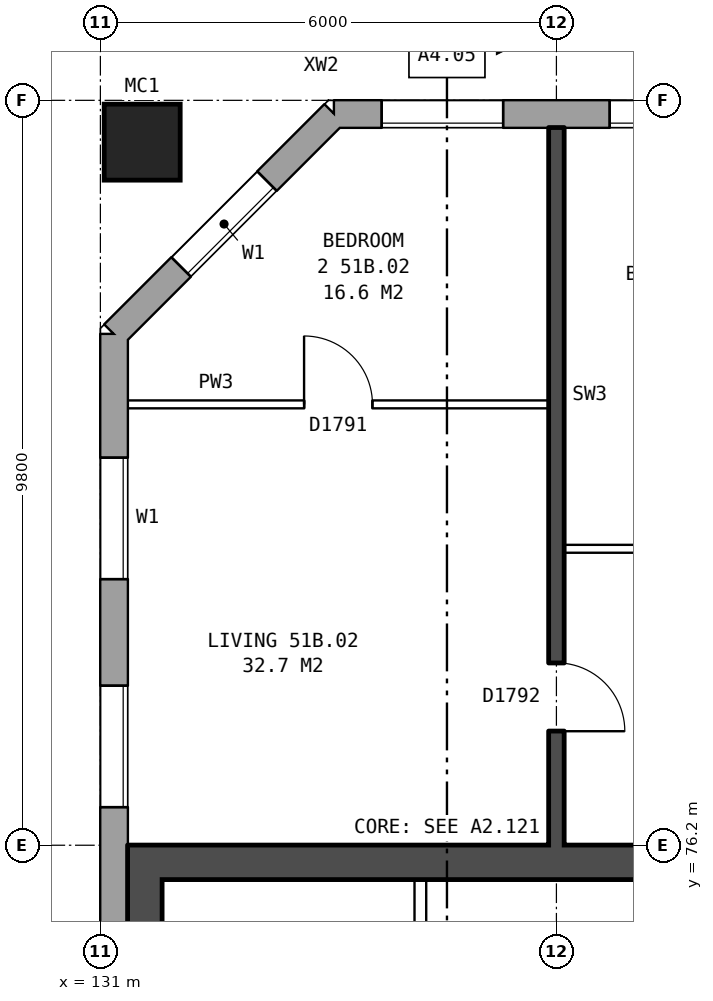
"""IFC4 building model, lengths in metres.
Left out: names, types, materials, properties, quantities, classifications, styles, units other than length and angle.
Written with IfcOpenShell. Run it as: python <this file> out.ifc"""

import sys

from ifc_helpers import new_model, si_unit, direction, frame, frame_2d, origin, origin_2d, place, context, subcontext, project, spatial, rectangle, hollow_rectangle, extrude, element, fill, save


model = new_model("IFC4")
c1 = context("Model", 3, precision=1e-05, world=origin(), true_north=direction((0.0, 1.0)))
c2 = subcontext(c1, "Body", "Model", "MODEL_VIEW")
j1 = project(units=[si_unit("LENGTHUNIT", "METRE"), si_unit("PLANEANGLEUNIT", "RADIAN")], contexts=[c1])
p1 = place(None, origin())
s1 = spatial("IfcSite", under=j1, at=p1, CompositionType="ELEMENT")
p2 = place(p1, origin())
s2 = spatial("IfcBuilding", under=s1, at=p2, CompositionType="ELEMENT")
p3 = place(p2, frame((0.0, 0.0, 182.0)))
s3 = spatial("IfcBuildingStorey", under=s2, at=p3, CompositionType="ELEMENT", Elevation=182.0)
p4 = place(p3, frame((131.55, 85.45, 0.0), z_axis=(0.0, 0.0, 1.0), x_axis=(1.0, 0.0, 0.0)))
e1 = element("IfcColumn", 1, at=p4, inside=s3, PredefinedType="COLUMN", context=c2, shape_type="SweptSolid", body=[
    extrude(hollow_rectangle(XDim=1.0, YDim=1.0, WallThickness=0.055, at=origin_2d()), origin(), (0.0, 0.0, 1.0), 3.1),
])
p5 = place(p3, frame((167.175, 85.82, 0.0), z_axis=(0.0, 0.0, 1.0), x_axis=(-1.0, 0.0, 0.0)))
e2 = element("IfcWall", 2, at=p5, inside=s3, PredefinedType="STANDARD", context=c2, shape_type="SweptSolid", body=[
    extrude(rectangle(XDim=33.101, YDim=0.36, at=frame_2d((16.55, 0.0))), origin(), (0.0, 0.0, 1.0), 2.85),
])
p6 = place(p5, frame((0.875, 0.0, 0.8)))
e3 = element("IfcOpeningElement", 3, at=p6, cuts=e2, PredefinedType="OPENING", context=c2, shape_type="SweptSolid", body=[
    extrude(rectangle(XDim=1.6, YDim=1.8, at=frame_2d((0.8, 0.9))), frame((0.0, 0.19, 0.0), z_axis=(0.0, -1.0, 0.0), x_axis=(1.0, 0.0, 0.0)), (0.0, 0.0, 1.0), 0.38),
])
p7 = place(p5, frame((3.875, 0.0, 0.8)))
e4 = element("IfcOpeningElement", 4, at=p7, cuts=e2, PredefinedType="OPENING", context=c2, shape_type="SweptSolid", body=[
    extrude(rectangle(XDim=1.6, YDim=1.8, at=frame_2d((0.8, 0.9))), frame((0.0, 0.19, 0.0), z_axis=(0.0, -1.0, 0.0), x_axis=(1.0, 0.0, 0.0)), (0.0, 0.0, 1.0), 0.38),
])
p8 = place(p5, frame((6.375, 0.0, 1.5)))
e5 = element("IfcOpeningElement", 5, at=p8, cuts=e2, PredefinedType="OPENING", context=c2, shape_type="SweptSolid", body=[
    extrude(rectangle(XDim=0.6, YDim=0.9, at=frame_2d((0.3, 0.45))), frame((0.0, 0.19, 0.0), z_axis=(0.0, -1.0, 0.0), x_axis=(1.0, 0.0, 0.0)), (0.0, 0.0, 1.0), 0.38),
])
p9 = place(p5, frame((9.875, 0.0, 0.8)))
e6 = element("IfcOpeningElement", 6, at=p9, cuts=e2, PredefinedType="OPENING", context=c2, shape_type="SweptSolid", body=[
    extrude(rectangle(XDim=1.6, YDim=1.8, at=frame_2d((0.8, 0.9))), frame((0.0, 0.19, 0.0), z_axis=(0.0, -1.0, 0.0), x_axis=(1.0, 0.0, 0.0)), (0.0, 0.0, 1.0), 0.38),
])
p10 = place(p5, frame((12.875, 0.0, 0.8)))
e7 = element("IfcOpeningElement", 7, at=p10, cuts=e2, PredefinedType="OPENING", context=c2, shape_type="SweptSolid", body=[
    extrude(rectangle(XDim=1.6, YDim=1.8, at=frame_2d((0.8, 0.9))), frame((0.0, 0.19, 0.0), z_axis=(0.0, -1.0, 0.0), x_axis=(1.0, 0.0, 0.0)), (0.0, 0.0, 1.0), 0.38),
])
p11 = place(p5, frame((15.875, 0.0, 0.8)))
e8 = element("IfcOpeningElement", 8, at=p11, cuts=e2, PredefinedType="OPENING", context=c2, shape_type="SweptSolid", body=[
    extrude(rectangle(XDim=1.6, YDim=1.8, at=frame_2d((0.8, 0.9))), frame((0.0, 0.19, 0.0), z_axis=(0.0, -1.0, 0.0), x_axis=(1.0, 0.0, 0.0)), (0.0, 0.0, 1.0), 0.38),
])
p12 = place(p5, frame((18.875, 0.0, 0.8)))
e9 = element("IfcOpeningElement", 9, at=p12, cuts=e2, PredefinedType="OPENING", context=c2, shape_type="SweptSolid", body=[
    extrude(rectangle(XDim=1.6, YDim=1.8, at=frame_2d((0.8, 0.9))), frame((0.0, 0.19, 0.0), z_axis=(0.0, -1.0, 0.0), x_axis=(1.0, 0.0, 0.0)), (0.0, 0.0, 1.0), 0.38),
])
p13 = place(p5, frame((21.875, 0.0, 0.8)))
e10 = element("IfcOpeningElement", 10, at=p13, cuts=e2, PredefinedType="OPENING", context=c2, shape_type="SweptSolid", body=[
    extrude(rectangle(XDim=1.6, YDim=1.8, at=frame_2d((0.8, 0.9))), frame((0.0, 0.19, 0.0), z_axis=(0.0, -1.0, 0.0), x_axis=(1.0, 0.0, 0.0)), (0.0, 0.0, 1.0), 0.38),
])
p14 = place(p5, frame((25.975, 0.0, 1.7)))
e11 = element("IfcOpeningElement", 11, at=p14, cuts=e2, PredefinedType="OPENING", context=c2, shape_type="SweptSolid", body=[
    extrude(rectangle(XDim=0.6, YDim=0.9, at=frame_2d((0.3, 0.45))), frame((0.0, 0.19, 0.0), z_axis=(0.0, -1.0, 0.0), x_axis=(1.0, 0.0, 0.0)), (0.0, 0.0, 1.0), 0.38),
])
p15 = place(p5, frame((27.875, 0.0, 0.8)))
e12 = element("IfcOpeningElement", 12, at=p15, cuts=e2, PredefinedType="OPENING", context=c2, shape_type="SweptSolid", body=[
    extrude(rectangle(XDim=1.6, YDim=1.8, at=frame_2d((0.8, 0.9))), frame((0.0, 0.19, 0.0), z_axis=(0.0, -1.0, 0.0), x_axis=(1.0, 0.0, 0.0)), (0.0, 0.0, 1.0), 0.38),
])
p16 = place(p5, frame((30.875, 0.0, 0.8)))
e13 = element("IfcOpeningElement", 13, at=p16, cuts=e2, PredefinedType="OPENING", context=c2, shape_type="SweptSolid", body=[
    extrude(rectangle(XDim=1.6, YDim=1.8, at=frame_2d((0.8, 0.9))), frame((0.0, 0.19, 0.0), z_axis=(0.0, -1.0, 0.0), x_axis=(1.0, 0.0, 0.0)), (0.0, 0.0, 1.0), 0.38),
])
p17 = place(p5, frame((8.175, 0.0, 0.8)))
e14 = element("IfcOpeningElement", 14, at=p17, cuts=e2, PredefinedType="OPENING", context=c2, shape_type="SweptSolid", body=[
    extrude(rectangle(XDim=1.4, YDim=0.9, at=frame_2d((0.7, 0.45))), frame((0.0, 0.19, 0.0), z_axis=(0.0, -1.0, 0.0), x_axis=(1.0, 0.0, 0.0)), (0.0, 0.0, 1.0), 0.38),
])
p18 = place(p5, frame((26.875, 0.0, 0.8)))
e15 = element("IfcOpeningElement", 15, at=p18, cuts=e2, PredefinedType="OPENING", context=c2, shape_type="SweptSolid", body=[
    extrude(rectangle(XDim=0.6, YDim=1.8, at=frame_2d((0.3, 0.9))), frame((0.0, 0.19, 0.0), z_axis=(0.0, -1.0, 0.0), x_axis=(1.0, 0.0, 0.0)), (0.0, 0.0, 1.0), 0.38),
])
p19 = place(p3, frame((134.075, 85.82, 0.0), z_axis=(0.0, 0.0, 1.0), x_axis=(-0.707106781187, -0.707106781187, 0.0)))
e16 = element("IfcWall", 16, at=p19, inside=s3, PredefinedType="STANDARD", context=c2, shape_type="SweptSolid", body=[
    extrude(rectangle(XDim=4.094, YDim=0.36, at=frame_2d((2.047, 0.0))), origin(), (0.0, 0.0, 1.0), 2.85),
])
p20 = place(p19, frame((1.247, 0.0, 0.8)))
e17 = element("IfcOpeningElement", 17, at=p20, cuts=e16, PredefinedType="OPENING", context=c2, shape_type="SweptSolid", body=[
    extrude(rectangle(XDim=1.6, YDim=1.8, at=frame_2d((0.8, 0.9))), frame((0.0, 0.19, 0.0), z_axis=(0.0, -1.0, 0.0), x_axis=(1.0, 0.0, 0.0)), (0.0, 0.0, 1.0), 0.38),
])
p21 = place(p3, frame((131.18, 82.925, 0.0), z_axis=(0.0, 0.0, 1.0), x_axis=(0.0, -1.0, 0.0)))
e18 = element("IfcWall", 18, at=p21, inside=s3, PredefinedType="STANDARD", context=c2, shape_type="SweptSolid", body=[
    extrude(rectangle(XDim=25.851, YDim=0.36, at=frame_2d((12.925, 0.0))), origin(), (0.0, 0.0, 1.0), 2.85),
])
p22 = place(p21, frame((1.625, 0.0, 0.8)))
e19 = element("IfcOpeningElement", 19, at=p22, cuts=e18, PredefinedType="OPENING", context=c2, shape_type="SweptSolid", body=[
    extrude(rectangle(XDim=1.6, YDim=1.8, at=frame_2d((0.8, 0.9))), frame((0.0, 0.19, 0.0), z_axis=(0.0, -1.0, 0.0), x_axis=(1.0, 0.0, 0.0)), (0.0, 0.0, 1.0), 0.38),
])
p23 = place(p21, frame((4.625, 0.0, 0.8)))
e20 = element("IfcOpeningElement", 20, at=p23, cuts=e18, PredefinedType="OPENING", context=c2, shape_type="SweptSolid", body=[
    extrude(rectangle(XDim=1.6, YDim=1.8, at=frame_2d((0.8, 0.9))), frame((0.0, 0.19, 0.0), z_axis=(0.0, -1.0, 0.0), x_axis=(1.0, 0.0, 0.0)), (0.0, 0.0, 1.0), 0.38),
])
p24 = place(p21, frame((19.625, 0.0, 0.8)))
e21 = element("IfcOpeningElement", 21, at=p24, cuts=e18, PredefinedType="OPENING", context=c2, shape_type="SweptSolid", body=[
    extrude(rectangle(XDim=1.6, YDim=1.8, at=frame_2d((0.8, 0.9))), frame((0.0, 0.19, 0.0), z_axis=(0.0, -1.0, 0.0), x_axis=(1.0, 0.0, 0.0)), (0.0, 0.0, 1.0), 0.38),
])
p25 = place(p21, frame((22.625, 0.0, 0.8)))
e22 = element("IfcOpeningElement", 22, at=p25, cuts=e18, PredefinedType="OPENING", context=c2, shape_type="SweptSolid", body=[
    extrude(rectangle(XDim=1.6, YDim=1.8, at=frame_2d((0.8, 0.9))), frame((0.0, 0.19, 0.0), z_axis=(0.0, -1.0, 0.0), x_axis=(1.0, 0.0, 0.0)), (0.0, 0.0, 1.0), 0.38),
])
p26 = place(p3, frame((131.585, 63.8, 0.0), z_axis=(0.0, 0.0, 1.0), x_axis=(0.0, 1.0, 0.0)))
e23 = element("IfcWall", 23, at=p26, inside=s3, PredefinedType="SHEAR", context=c2, shape_type="SweptSolid", body=[
    extrude(rectangle(XDim=12.4, YDim=0.45, at=frame_2d((6.2, 0.0))), origin(), (0.0, 0.0, 1.0), 2.85),
])
p27 = place(p3, frame((139.31, 75.975, 0.0), z_axis=(0.0, 0.0, 1.0), x_axis=(-1.0, 0.0, 0.0)))
e24 = element("IfcWall", 24, at=p27, inside=s3, PredefinedType="SHEAR", context=c2, shape_type="SweptSolid", body=[
    extrude(rectangle(XDim=7.5, YDim=0.45, at=frame_2d((3.75, 0.0))), origin(), (0.0, 0.0, 1.0), 2.85),
])
p28 = place(p3, frame((135.21, 71.375, 0.0), z_axis=(0.0, 0.0, 1.0), x_axis=(0.0, 1.0, 0.0)))
e25 = element("IfcWall", 25, at=p28, inside=s3, PredefinedType="PARTITIONING", context=c2, shape_type="SweptSolid", body=[
    extrude(rectangle(XDim=4.375, YDim=0.15, at=frame_2d((2.188, 0.0))), origin(), (0.0, 0.0, 1.0), 2.85),
])
p29 = place(p28, frame((2.675, 0.0, 0.0)))
e26 = element("IfcOpeningElement", 26, at=p29, cuts=e25, PredefinedType="OPENING", context=c2, shape_type="SweptSolid", body=[
    extrude(rectangle(XDim=1.1, YDim=2.1, at=frame_2d((0.55, 1.05))), frame((0.0, 0.085, 0.0), z_axis=(0.0, -1.0, 0.0), x_axis=(1.0, 0.0, 0.0)), (0.0, 0.0, 1.0), 0.17),
])
p30 = place(p3, frame((137.1, 80.1, 0.0), z_axis=(0.0, 0.0, 1.0), x_axis=(1.0, 0.0, 0.0)))
e27 = element("IfcWall", 27, at=p30, inside=s3, PredefinedType="PARTITIONING", context=c2, shape_type="SweptSolid", body=[
    extrude(rectangle(XDim=5.8, YDim=0.1, at=frame_2d((2.9, 0.0))), origin(), (0.0, 0.0, 1.0), 2.85),
])
p31 = place(p30, frame((1.3, 0.0, 0.0)))
e28 = element("IfcOpeningElement", 28, at=p31, cuts=e27, PredefinedType="OPENING", context=c2, shape_type="SweptSolid", body=[
    extrude(rectangle(XDim=0.9, YDim=2.1, at=frame_2d((0.45, 1.05))), frame((0.0, 0.06, 0.0), z_axis=(0.0, -1.0, 0.0), x_axis=(1.0, 0.0, 0.0)), (0.0, 0.0, 1.0), 0.12),
])
p32 = place(p30, frame((4.2, 0.0, 0.0)))
e29 = element("IfcOpeningElement", 29, at=p32, cuts=e27, PredefinedType="OPENING", context=c2, shape_type="SweptSolid", body=[
    extrude(rectangle(XDim=0.9, YDim=2.1, at=frame_2d((0.45, 1.05))), frame((0.0, 0.06, 0.0), z_axis=(0.0, -1.0, 0.0), x_axis=(1.0, 0.0, 0.0)), (0.0, 0.0, 1.0), 0.12),
])
p33 = place(p3, frame((131.36, 82.0, 0.0), z_axis=(0.0, 0.0, 1.0), x_axis=(1.0, 0.0, 0.0)))
e30 = element("IfcWall", 30, at=p33, inside=s3, PredefinedType="PARTITIONING", context=c2, shape_type="SweptSolid", body=[
    extrude(rectangle(XDim=5.54, YDim=0.1, at=frame_2d((2.77, 0.0))), origin(), (0.0, 0.0, 1.0), 2.85),
])
p34 = place(p33, frame((2.32, 0.0, 0.0)))
e31 = element("IfcOpeningElement", 31, at=p34, cuts=e30, PredefinedType="OPENING", context=c2, shape_type="SweptSolid", body=[
    extrude(rectangle(XDim=0.9, YDim=2.1, at=frame_2d((0.45, 1.05))), frame((0.0, 0.06, 0.0), z_axis=(0.0, -1.0, 0.0), x_axis=(1.0, 0.0, 0.0)), (0.0, 0.0, 1.0), 0.12),
])
p35 = place(p3, frame((137.0, 76.2, 0.0), z_axis=(0.0, 0.0, 1.0), x_axis=(0.0, 1.0, 0.0)))
e32 = element("IfcWall", 32, at=p35, inside=s3, PredefinedType="SOLIDWALL", context=c2, shape_type="SweptSolid", body=[
    extrude(rectangle(XDim=9.44, YDim=0.2, at=frame_2d((4.72, 0.0))), origin(), (0.0, 0.0, 1.0), 2.85),
])
p36 = place(p35, frame((1.5, 0.0, 0.0)))
e33 = element("IfcOpeningElement", 33, at=p36, cuts=e32, PredefinedType="OPENING", context=c2, shape_type="SweptSolid", body=[
    extrude(rectangle(XDim=0.9, YDim=2.1, at=frame_2d((0.45, 1.05))), frame((0.0, 0.11, 0.0), z_axis=(0.0, -1.0, 0.0), x_axis=(1.0, 0.0, 0.0)), (0.0, 0.0, 1.0), 0.22),
])
p37 = place(p15, origin())
e34 = element("IfcWindow", 34, at=p37, inside=s3, PartitioningType="SINGLE_PANEL", PredefinedType="WINDOW", context=c2, shape_type="SweptSolid", body=[
    extrude(rectangle(XDim=1.6, YDim=1.8, at=frame_2d((0.8, 0.9))), frame((0.0, 0.15, 0.0), z_axis=(0.0, -1.0, 0.0), x_axis=(1.0, 0.0, 0.0)), (0.0, 0.0, 1.0), 0.06),
])
fill(e12, e34)
p38 = place(p16, origin())
e35 = element("IfcWindow", 35, at=p38, inside=s3, PartitioningType="SINGLE_PANEL", PredefinedType="WINDOW", context=c2, shape_type="SweptSolid", body=[
    extrude(rectangle(XDim=1.6, YDim=1.8, at=frame_2d((0.8, 0.9))), frame((0.0, 0.15, 0.0), z_axis=(0.0, -1.0, 0.0), x_axis=(1.0, 0.0, 0.0)), (0.0, 0.0, 1.0), 0.06),
])
fill(e13, e35)
p39 = place(p20, origin())
e36 = element("IfcWindow", 36, at=p39, inside=s3, PartitioningType="SINGLE_PANEL", PredefinedType="WINDOW", context=c2, shape_type="SweptSolid", body=[
    extrude(rectangle(XDim=1.6, YDim=1.8, at=frame_2d((0.8, 0.9))), frame((0.0, 0.15, 0.0), z_axis=(0.0, -1.0, 0.0), x_axis=(1.0, 0.0, 0.0)), (0.0, 0.0, 1.0), 0.06),
])
fill(e17, e36)
p40 = place(p22, origin())
e37 = element("IfcWindow", 37, at=p40, inside=s3, PartitioningType="SINGLE_PANEL", PredefinedType="WINDOW", context=c2, shape_type="SweptSolid", body=[
    extrude(rectangle(XDim=1.6, YDim=1.8, at=frame_2d((0.8, 0.9))), frame((0.0, 0.15, 0.0), z_axis=(0.0, -1.0, 0.0), x_axis=(1.0, 0.0, 0.0)), (0.0, 0.0, 1.0), 0.06),
])
fill(e19, e37)
p41 = place(p23, origin())
e38 = element("IfcWindow", 38, at=p41, inside=s3, PartitioningType="SINGLE_PANEL", PredefinedType="WINDOW", context=c2, shape_type="SweptSolid", body=[
    extrude(rectangle(XDim=1.6, YDim=1.8, at=frame_2d((0.8, 0.9))), frame((0.0, 0.15, 0.0), z_axis=(0.0, -1.0, 0.0), x_axis=(1.0, 0.0, 0.0)), (0.0, 0.0, 1.0), 0.06),
])
fill(e20, e38)
p42 = place(p34, origin())
e39 = element("IfcDoor", 39, at=p42, inside=s3, OperationType="SINGLE_SWING_LEFT", PredefinedType="DOOR", context=c2, shape_type="SweptSolid", body=[
    extrude(rectangle(XDim=0.9, YDim=2.1, at=frame_2d((0.45, 1.05))), frame((0.0, 0.025, 0.0), z_axis=(0.0, -1.0, 0.0), x_axis=(1.0, 0.0, 0.0)), (0.0, 0.0, 1.0), 0.05),
])
fill(e31, e39)
p43 = place(p36, frame((0.9, 0.0, 0.0), z_axis=(0.0, 0.0, 1.0), x_axis=(-1.0, 0.0, 0.0)))
e40 = element("IfcDoor", 40, at=p43, inside=s3, OperationType="SINGLE_SWING_RIGHT", PredefinedType="DOOR", context=c2, shape_type="SweptSolid", body=[
    extrude(rectangle(XDim=0.9, YDim=2.1, at=frame_2d((0.45, 1.05))), frame((0.0, 0.025, 0.0), z_axis=(0.0, -1.0, 0.0), x_axis=(1.0, 0.0, 0.0)), (0.0, 0.0, 1.0), 0.05),
])
fill(e33, e40)
save(model, sys.argv[1])
